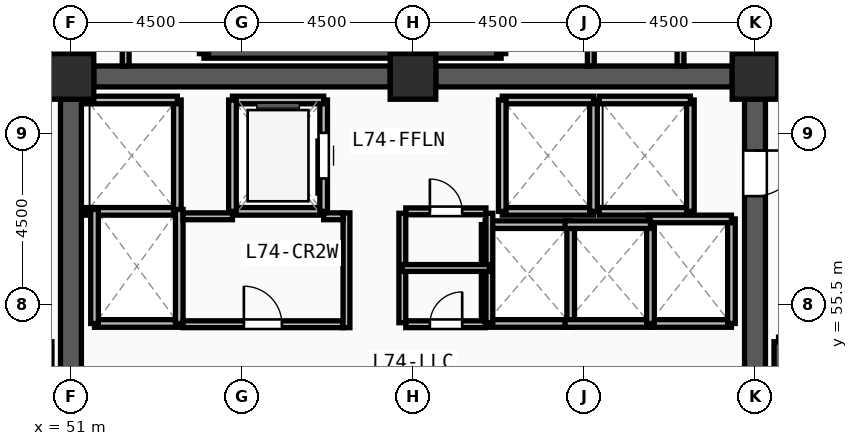
"""IFC4 building model, lengths in metres.
Left out: names, types, materials, properties, quantities, classifications, styles, units other than length and angle.
Written with IfcOpenShell. Run it as: python <this file> out.ifc"""

import sys

from ifc_helpers import new_model, si_unit, direction, frame, frame_2d, origin, origin_2d, place, context, subcontext, project, spatial, rectangle, extrude, source, transform, mapped, element, fill, save


model = new_model("IFC4")
c1 = context("Model", 3, precision=1e-05, world=origin(), true_north=direction((0.0, 1.0)))
c2 = subcontext(c1, "Body", "Model", "MODEL_VIEW")
j1 = project(units=[si_unit("LENGTHUNIT", "METRE"), si_unit("PLANEANGLEUNIT", "RADIAN")], contexts=[c1])
p1 = place(None, origin())
s1 = spatial("IfcSite", under=j1, at=p1, CompositionType="ELEMENT")
p2 = place(p1, origin())
s2 = spatial("IfcBuilding", under=s1, at=p2, CompositionType="ELEMENT")
p3 = place(p2, frame((0.0, 0.0, 286.5)))
s3 = spatial("IfcBuildingStorey", under=s2, at=p3, CompositionType="ELEMENT", Elevation=286.5)
m1 = source(origin(), c2, "Body", "SweptSolid", [
    extrude(rectangle(XDim=1.2, YDim=1.2, at=origin_2d()), origin(), (0.0, 0.0, 1.0), 3.75),
])
for number, where, z_axis, x_axis in (
    (1, (69.0, 61.5, 0.0), (0.0, 0.0, 1.0), (1.0, 0.0, 0.0)),
    (2, (60.0, 61.5, 0.0), (0.0, 0.0, 1.0), (1.0, 0.0, 0.0)),
    (3, (51.0, 61.5, 0.0), (0.0, 0.0, 1.0), (1.0, 0.0, 0.0)),
):
    element("IfcColumn", number, at=place(p3, frame(where, z_axis=z_axis, x_axis=x_axis)), inside=s3, PredefinedType="COLUMN", context=c2, shape_type="MappedRepresentation", body=[
        mapped(m1, transform((0.0, 0.0, 0.0), x_axis=(1.0, 0.0, 0.0), y_axis=(0.0, 1.0, 0.0), z_axis=(0.0, 0.0, 1.0), scale=1.0)),
    ])
for number, where, z_axis, x_axis in (
    (4, (51.6, 61.5, 0.0), (0.0, 0.0, 1.0), (1.0, 0.0, 0.0)),
    (5, (60.6, 61.5, 0.0), (0.0, 0.0, 1.0), (1.0, 0.0, 0.0)),
):
    element("IfcWall", number, at=place(p3, frame(where, z_axis=z_axis, x_axis=x_axis)), inside=s3, PredefinedType="SHEAR", context=c2, shape_type="SweptSolid", body=[
        extrude(rectangle(XDim=7.8, YDim=0.55, at=frame_2d((3.9, 0.0))), origin(), (0.0, 0.0, 1.0), 3.57),
    ])
p4 = place(p3, frame((69.0, 60.9, 0.0), z_axis=(0.0, 0.0, 1.0), x_axis=(0.0, -1.0, 0.0)))
e6 = element("IfcWall", 6, at=p4, inside=s3, PredefinedType="SHEAR", context=c2, shape_type="SweptSolid", body=[
    extrude(rectangle(XDim=13.8, YDim=0.55, at=frame_2d((6.9, 0.0))), origin(), (0.0, 0.0, 1.0), 3.57),
])
m2 = source(origin(), c2, "Body", "SweptSolid", [
    extrude(rectangle(XDim=1.2, YDim=2.2, at=frame_2d((0.6, 1.1))), frame((0.0, 0.285, 0.0), z_axis=(0.0, -1.0, 0.0), x_axis=(1.0, 0.0, 0.0)), (0.0, 0.0, 1.0), 0.57),
])
p5 = place(p4, frame((1.35, 0.0, 0.0)))
e7 = element("IfcOpeningElement", 7, at=p5, cuts=e6, PredefinedType="OPENING", context=c2, shape_type="MappedRepresentation", body=[
    mapped(m2, transform((0.0, 0.0, 0.0), x_axis=(1.0, 0.0, 0.0), y_axis=(0.0, 1.0, 0.0), z_axis=(0.0, 0.0, 1.0), scale=1.0)),
])
p6 = place(p3, frame((51.0, 47.1, 0.0), z_axis=(0.0, 0.0, 1.0), x_axis=(0.0, 1.0, 0.0)))
e8 = element("IfcWall", 8, at=p6, inside=s3, PredefinedType="SHEAR", context=c2, shape_type="SweptSolid", body=[
    extrude(rectangle(XDim=13.8, YDim=0.55, at=frame_2d((6.9, 0.0))), origin(), (0.0, 0.0, 1.0), 3.57),
])
for number, where, z_axis, x_axis in (
    (9, (69.62, 54.52, 0.0), (0.0, 0.0, 1.0), (0.0, -1.0, 0.0)),
    (10, (54.5, 62.1, 0.0), (0.0, 0.0, 1.0), (1.0, 0.0, 0.0)),
):
    element("IfcWall", number, at=place(p3, frame(where, z_axis=z_axis, x_axis=x_axis)), inside=s3, PredefinedType="SOLIDWALL", context=c2, shape_type="SweptSolid", body=[
        extrude(rectangle(XDim=7.82, YDim=0.24, at=frame_2d((3.91, 0.0))), origin(), (0.0, 0.0, 1.0), 3.57),
    ])
for number, where, z_axis, x_axis in (
    (11, (62.32, 62.1, 0.0), (0.0, 0.0, 1.0), (0.0, 1.0, 0.0)),
    (12, (54.5, 65.54, 0.0), (0.0, 0.0, 1.0), (0.0, -1.0, 0.0)),
):
    element("IfcWall", number, at=place(p3, frame(where, z_axis=z_axis, x_axis=x_axis)), inside=s3, PredefinedType="SOLIDWALL", context=c2, shape_type="SweptSolid", body=[
        extrude(rectangle(XDim=3.44, YDim=0.24, at=frame_2d((1.72, 0.0))), origin(), (0.0, 0.0, 1.0), 3.57),
    ])
p7 = place(p3, frame((55.25, 57.95, 0.0), z_axis=(0.0, 0.0, 1.0), x_axis=(1.0, 0.0, 0.0)))
e13 = element("IfcWall", 13, at=p7, inside=s3, PredefinedType="SOLIDWALL", context=c2, shape_type="SweptSolid", body=[
    extrude(rectangle(XDim=2.4, YDim=0.2, at=frame_2d((1.2, 0.0))), origin(), (0.0, 0.0, 1.0), 3.57),
])
p8 = place(p3, frame((57.65, 57.95, 0.0), z_axis=(0.0, 0.0, 1.0), x_axis=(0.0, 1.0, 0.0)))
e14 = element("IfcWall", 14, at=p8, inside=s3, PredefinedType="SOLIDWALL", context=c2, shape_type="SweptSolid", body=[
    extrude(rectangle(XDim=2.93, YDim=0.2, at=frame_2d((1.465, 0.0))), origin(), (0.0, 0.0, 1.0), 3.57),
])
m3 = source(origin(), c2, "Body", "SweptSolid", [
    extrude(rectangle(XDim=1.2, YDim=2.3, at=frame_2d((0.6, 1.15))), frame((0.0, 0.11, 0.0), z_axis=(0.0, -1.0, 0.0), x_axis=(1.0, 0.0, 0.0)), (0.0, 0.0, 1.0), 0.22),
])
p9 = place(p8, frame((0.865, 0.0, 0.0)))
e15 = element("IfcOpeningElement", 15, at=p9, cuts=e14, PredefinedType="OPENING", context=c2, shape_type="MappedRepresentation", body=[
    mapped(m3, transform((0.0, 0.0, 0.0), x_axis=(1.0, 0.0, 0.0), y_axis=(0.0, 1.0, 0.0), z_axis=(0.0, 0.0, 1.0), scale=1.0)),
])
p10 = place(p3, frame((57.65, 60.88, 0.0), z_axis=(0.0, 0.0, 1.0), x_axis=(-1.0, 0.0, 0.0)))
e16 = element("IfcWall", 16, at=p10, inside=s3, PredefinedType="SOLIDWALL", context=c2, shape_type="SweptSolid", body=[
    extrude(rectangle(XDim=2.4, YDim=0.2, at=frame_2d((1.2, 0.0))), origin(), (0.0, 0.0, 1.0), 3.57),
])
p11 = place(p3, frame((55.25, 60.88, 0.0), z_axis=(0.0, 0.0, 1.0), x_axis=(0.0, -1.0, 0.0)))
e17 = element("IfcWall", 17, at=p11, inside=s3, PredefinedType="SOLIDWALL", context=c2, shape_type="SweptSolid", body=[
    extrude(rectangle(XDim=2.93, YDim=0.2, at=frame_2d((1.465, 0.0))), origin(), (0.0, 0.0, 1.0), 3.57),
])
p12 = place(p3, frame((62.35, 57.95, 0.0), z_axis=(0.0, 0.0, 1.0), x_axis=(1.0, 0.0, 0.0)))
e18 = element("IfcWall", 18, at=p12, inside=s3, PredefinedType="SOLIDWALL", context=c2, shape_type="SweptSolid", body=[
    extrude(rectangle(XDim=2.4, YDim=0.2, at=frame_2d((1.2, 0.0))), origin(), (0.0, 0.0, 1.0), 3.57),
])
p13 = place(p3, frame((64.75, 57.95, 0.0), z_axis=(0.0, 0.0, 1.0), x_axis=(0.0, 1.0, 0.0)))
e19 = element("IfcWall", 19, at=p13, inside=s3, PredefinedType="SOLIDWALL", context=c2, shape_type="SweptSolid", body=[
    extrude(rectangle(XDim=2.93, YDim=0.2, at=frame_2d((1.465, 0.0))), origin(), (0.0, 0.0, 1.0), 3.57),
])
p14 = place(p3, frame((64.75, 60.88, 0.0), z_axis=(0.0, 0.0, 1.0), x_axis=(-1.0, 0.0, 0.0)))
e20 = element("IfcWall", 20, at=p14, inside=s3, PredefinedType="SOLIDWALL", context=c2, shape_type="SweptSolid", body=[
    extrude(rectangle(XDim=2.4, YDim=0.2, at=frame_2d((1.2, 0.0))), origin(), (0.0, 0.0, 1.0), 3.57),
])
p15 = place(p3, frame((62.35, 60.88, 0.0), z_axis=(0.0, 0.0, 1.0), x_axis=(0.0, -1.0, 0.0)))
e21 = element("IfcWall", 21, at=p15, inside=s3, PredefinedType="SOLIDWALL", context=c2, shape_type="SweptSolid", body=[
    extrude(rectangle(XDim=2.93, YDim=0.2, at=frame_2d((1.465, 0.0))), origin(), (0.0, 0.0, 1.0), 3.57),
])
p16 = place(p3, frame((64.9, 57.95, 0.0), z_axis=(0.0, 0.0, 1.0), x_axis=(1.0, 0.0, 0.0)))
e22 = element("IfcWall", 22, at=p16, inside=s3, PredefinedType="SOLIDWALL", context=c2, shape_type="SweptSolid", body=[
    extrude(rectangle(XDim=2.4, YDim=0.2, at=frame_2d((1.2, 0.0))), origin(), (0.0, 0.0, 1.0), 3.57),
])
p17 = place(p3, frame((67.3, 57.95, 0.0), z_axis=(0.0, 0.0, 1.0), x_axis=(0.0, 1.0, 0.0)))
e23 = element("IfcWall", 23, at=p17, inside=s3, PredefinedType="SOLIDWALL", context=c2, shape_type="SweptSolid", body=[
    extrude(rectangle(XDim=2.93, YDim=0.2, at=frame_2d((1.465, 0.0))), origin(), (0.0, 0.0, 1.0), 3.57),
])
for number, where, z_axis, x_axis in (
    (24, (67.3, 60.88, 0.0), (0.0, 0.0, 1.0), (-1.0, 0.0, 0.0)),
    (25, (51.4, 57.95, 0.0), (0.0, 0.0, 1.0), (1.0, 0.0, 0.0)),
):
    element("IfcWall", number, at=place(p3, frame(where, z_axis=z_axis, x_axis=x_axis)), inside=s3, PredefinedType="SOLIDWALL", context=c2, shape_type="SweptSolid", body=[
        extrude(rectangle(XDim=2.4, YDim=0.2, at=frame_2d((1.2, 0.0))), origin(), (0.0, 0.0, 1.0), 3.57),
    ])
p18 = place(p3, frame((53.8, 57.95, 0.0), z_axis=(0.0, 0.0, 1.0), x_axis=(0.0, 1.0, 0.0)))
e26 = element("IfcWall", 26, at=p18, inside=s3, PredefinedType="SOLIDWALL", context=c2, shape_type="SweptSolid", body=[
    extrude(rectangle(XDim=2.93, YDim=0.2, at=frame_2d((1.465, 0.0))), origin(), (0.0, 0.0, 1.0), 3.57),
])
p19 = place(p3, frame((53.8, 60.88, 0.0), z_axis=(0.0, 0.0, 1.0), x_axis=(-1.0, 0.0, 0.0)))
e27 = element("IfcWall", 27, at=p19, inside=s3, PredefinedType="SOLIDWALL", context=c2, shape_type="SweptSolid", body=[
    extrude(rectangle(XDim=2.4, YDim=0.2, at=frame_2d((1.2, 0.0))), origin(), (0.0, 0.0, 1.0), 3.57),
])
p20 = place(p3, frame((51.62, 55.0, 0.0), z_axis=(0.0, 0.0, 1.0), x_axis=(1.0, 0.0, 0.0)))
e28 = element("IfcWall", 28, at=p20, inside=s3, PredefinedType="SOLIDWALL", context=c2, shape_type="SweptSolid", body=[
    extrude(rectangle(XDim=2.23, YDim=0.2, at=frame_2d((1.115, 0.0))), origin(), (0.0, 0.0, 1.0), 3.57),
])
for number, where, z_axis, x_axis in (
    (29, (53.85, 55.0, 0.0), (0.0, 0.0, 1.0), (0.0, 1.0, 0.0)),
    (30, (51.62, 58.0, 0.0), (0.0, 0.0, 1.0), (0.0, -1.0, 0.0)),
):
    element("IfcWall", number, at=place(p3, frame(where, z_axis=z_axis, x_axis=x_axis)), inside=s3, PredefinedType="SOLIDWALL", context=c2, shape_type="SweptSolid", body=[
        extrude(rectangle(XDim=3.0, YDim=0.2, at=frame_2d((1.5, 0.0))), origin(), (0.0, 0.0, 1.0), 3.57),
    ])
p21 = place(p3, frame((66.2, 55.0, 0.0), z_axis=(0.0, 0.0, 1.0), x_axis=(1.0, 0.0, 0.0)))
e31 = element("IfcWall", 31, at=p21, inside=s3, PredefinedType="SOLIDWALL", context=c2, shape_type="SweptSolid", body=[
    extrude(rectangle(XDim=2.18, YDim=0.2, at=frame_2d((1.09, 0.0))), origin(), (0.0, 0.0, 1.0), 3.57),
])
p22 = place(p3, frame((68.38, 55.0, 0.0), z_axis=(0.0, 0.0, 1.0), x_axis=(0.0, 1.0, 0.0)))
e32 = element("IfcWall", 32, at=p22, inside=s3, PredefinedType="SOLIDWALL", context=c2, shape_type="SweptSolid", body=[
    extrude(rectangle(XDim=2.75, YDim=0.2, at=frame_2d((1.375, 0.0))), origin(), (0.0, 0.0, 1.0), 3.57),
])
p23 = place(p3, frame((68.38, 57.75, 0.0), z_axis=(0.0, 0.0, 1.0), x_axis=(-1.0, 0.0, 0.0)))
e33 = element("IfcWall", 33, at=p23, inside=s3, PredefinedType="SOLIDWALL", context=c2, shape_type="SweptSolid", body=[
    extrude(rectangle(XDim=2.18, YDim=0.2, at=frame_2d((1.09, 0.0))), origin(), (0.0, 0.0, 1.0), 3.57),
])
p24 = place(p3, frame((61.9, 55.0, 0.0), z_axis=(0.0, 0.0, 1.0), x_axis=(1.0, 0.0, 0.0)))
e34 = element("IfcWall", 34, at=p24, inside=s3, PredefinedType="SOLIDWALL", context=c2, shape_type="SweptSolid", body=[
    extrude(rectangle(XDim=2.25, YDim=0.2, at=frame_2d((1.125, 0.0))), origin(), (0.0, 0.0, 1.0), 3.57),
])
p25 = place(p3, frame((64.15, 55.0, 0.0), z_axis=(0.0, 0.0, 1.0), x_axis=(0.0, 1.0, 0.0)))
e35 = element("IfcWall", 35, at=p25, inside=s3, PredefinedType="SOLIDWALL", context=c2, shape_type="SweptSolid", body=[
    extrude(rectangle(XDim=2.6, YDim=0.2, at=frame_2d((1.3, 0.0))), origin(), (0.0, 0.0, 1.0), 3.57),
])
p26 = place(p3, frame((64.15, 57.6, 0.0), z_axis=(0.0, 0.0, 1.0), x_axis=(-1.0, 0.0, 0.0)))
e36 = element("IfcWall", 36, at=p26, inside=s3, PredefinedType="SOLIDWALL", context=c2, shape_type="SweptSolid", body=[
    extrude(rectangle(XDim=2.25, YDim=0.2, at=frame_2d((1.125, 0.0))), origin(), (0.0, 0.0, 1.0), 3.57),
])
p27 = place(p3, frame((61.9, 57.6, 0.0), z_axis=(0.0, 0.0, 1.0), x_axis=(0.0, -1.0, 0.0)))
e37 = element("IfcWall", 37, at=p27, inside=s3, PredefinedType="SOLIDWALL", context=c2, shape_type="SweptSolid", body=[
    extrude(rectangle(XDim=2.6, YDim=0.2, at=frame_2d((1.3, 0.0))), origin(), (0.0, 0.0, 1.0), 3.57),
])
p28 = place(p3, frame((64.0, 55.0, 0.0), z_axis=(0.0, 0.0, 1.0), x_axis=(1.0, 0.0, 0.0)))
e38 = element("IfcWall", 38, at=p28, inside=s3, PredefinedType="SOLIDWALL", context=c2, shape_type="SweptSolid", body=[
    extrude(rectangle(XDim=2.25, YDim=0.2, at=frame_2d((1.125, 0.0))), origin(), (0.0, 0.0, 1.0), 3.57),
])
p29 = place(p3, frame((66.25, 55.0, 0.0), z_axis=(0.0, 0.0, 1.0), x_axis=(0.0, 1.0, 0.0)))
e39 = element("IfcWall", 39, at=p29, inside=s3, PredefinedType="SOLIDWALL", context=c2, shape_type="SweptSolid", body=[
    extrude(rectangle(XDim=2.6, YDim=0.2, at=frame_2d((1.3, 0.0))), origin(), (0.0, 0.0, 1.0), 3.57),
])
p30 = place(p3, frame((66.25, 57.6, 0.0), z_axis=(0.0, 0.0, 1.0), x_axis=(-1.0, 0.0, 0.0)))
e40 = element("IfcWall", 40, at=p30, inside=s3, PredefinedType="SOLIDWALL", context=c2, shape_type="SweptSolid", body=[
    extrude(rectangle(XDim=2.25, YDim=0.2, at=frame_2d((1.125, 0.0))), origin(), (0.0, 0.0, 1.0), 3.57),
])
p31 = place(p3, frame((53.95, 54.98, 0.0), z_axis=(0.0, 0.0, 1.0), x_axis=(1.0, 0.0, 0.0)))
e41 = element("IfcWall", 41, at=p31, inside=s3, PredefinedType="PARTITIONING", context=c2, shape_type="SweptSolid", body=[
    extrude(rectangle(XDim=4.21, YDim=0.18, at=frame_2d((2.105, 0.0))), origin(), (0.0, 0.0, 1.0), 3.57),
])
m4 = source(origin(), c2, "Body", "SweptSolid", [
    extrude(rectangle(XDim=1.0, YDim=2.2, at=frame_2d((0.5, 1.1))), frame((0.0, 0.1, 0.0), z_axis=(0.0, -1.0, 0.0), x_axis=(1.0, 0.0, 0.0)), (0.0, 0.0, 1.0), 0.2),
])
p32 = place(p31, frame((1.6, 0.0, 0.0)))
e42 = element("IfcOpeningElement", 42, at=p32, cuts=e41, PredefinedType="OPENING", context=c2, shape_type="MappedRepresentation", body=[
    mapped(m4, transform((0.0, 0.0, 0.0), x_axis=(1.0, 0.0, 0.0), y_axis=(0.0, 1.0, 0.0), z_axis=(0.0, 0.0, 1.0), scale=1.0)),
])
p33 = place(p3, frame((59.81, 54.98, 0.0), z_axis=(0.0, 0.0, 1.0), x_axis=(1.0, 0.0, 0.0)))
e43 = element("IfcWall", 43, at=p33, inside=s3, PredefinedType="PARTITIONING", context=c2, shape_type="SweptSolid", body=[
    extrude(rectangle(XDim=2.09, YDim=0.18, at=frame_2d((1.045, 0.0))), origin(), (0.0, 0.0, 1.0), 3.57),
])
m5 = source(origin(), c2, "Body", "SweptSolid", [
    extrude(rectangle(XDim=0.85, YDim=2.1, at=frame_2d((0.425, 1.05))), frame((0.0, 0.1, 0.0), z_axis=(0.0, -1.0, 0.0), x_axis=(1.0, 0.0, 0.0)), (0.0, 0.0, 1.0), 0.2),
])
p34 = place(p33, frame((0.635, 0.0, 0.0)))
e44 = element("IfcOpeningElement", 44, at=p34, cuts=e43, PredefinedType="OPENING", context=c2, shape_type="MappedRepresentation", body=[
    mapped(m5, transform((0.0, 0.0, 0.0), x_axis=(1.0, 0.0, 0.0), y_axis=(0.0, 1.0, 0.0), z_axis=(0.0, 0.0, 1.0), scale=1.0)),
])
p35 = place(p3, frame((59.81, 57.95, 0.0), z_axis=(0.0, 0.0, 1.0), x_axis=(1.0, 0.0, 0.0)))
e45 = element("IfcWall", 45, at=p35, inside=s3, PredefinedType="PARTITIONING", context=c2, shape_type="SweptSolid", body=[
    extrude(rectangle(XDim=2.11, YDim=0.18, at=frame_2d((1.055, 0.0))), origin(), (0.0, 0.0, 1.0), 3.57),
])
p36 = place(p35, frame((0.635, 0.0, 0.0)))
e46 = element("IfcOpeningElement", 46, at=p36, cuts=e45, PredefinedType="OPENING", context=c2, shape_type="MappedRepresentation", body=[
    mapped(m5, transform((0.0, 0.0, 0.0), x_axis=(1.0, 0.0, 0.0), y_axis=(0.0, 1.0, 0.0), z_axis=(0.0, 0.0, 1.0), scale=1.0)),
])
for number, where, z_axis, x_axis in (
    (47, (59.72, 55.02, 0.0), (0.0, 0.0, 1.0), (0.0, 1.0, 0.0)),
    (48, (62.01, 55.02, 0.0), (0.0, 0.0, 1.0), (0.0, 1.0, 0.0)),
):
    element("IfcWall", number, at=place(p3, frame(where, z_axis=z_axis, x_axis=x_axis)), inside=s3, PredefinedType="PARTITIONING", context=c2, shape_type="SweptSolid", body=[
        extrude(rectangle(XDim=2.88, YDim=0.18, at=frame_2d((1.44, 0.0))), origin(), (0.0, 0.0, 1.0), 3.57),
    ])
p37 = place(p3, frame((59.72, 56.46, 0.0), z_axis=(0.0, 0.0, 1.0), x_axis=(1.0, 0.0, 0.0)))
e49 = element("IfcWall", 49, at=p37, inside=s3, PredefinedType="PARTITIONING", context=c2, shape_type="SweptSolid", body=[
    extrude(rectangle(XDim=2.29, YDim=0.18, at=frame_2d((1.145, 0.0))), origin(), (0.0, 0.0, 1.0), 3.57),
])
p38 = place(p3, frame((50.54, 61.95, 0.0), z_axis=(0.0, 0.0, 1.0), x_axis=(0.0, 1.0, 0.0)))
e50 = element("IfcWall", 50, at=p38, inside=s3, PredefinedType="PARTITIONING", context=c2, shape_type="SweptSolid", body=[
    extrude(rectangle(XDim=3.63, YDim=0.18, at=frame_2d((1.815, 0.0))), origin(), (0.0, 0.0, 1.0), 3.57),
])
for number, where, z_axis, x_axis in (
    (51, (52.44, 61.775, 0.0), (0.0, 0.0, 1.0), (0.0, 1.0, 0.0)),
    (52, (64.68, 61.775, 0.0), (0.0, 0.0, 1.0), (0.0, 1.0, 0.0)),
    (53, (67.04, 61.775, 0.0), (0.0, 0.0, 1.0), (0.0, 1.0, 0.0)),
):
    element("IfcWall", number, at=place(p3, frame(where, z_axis=z_axis, x_axis=x_axis)), inside=s3, PredefinedType="PARTITIONING", context=c2, shape_type="SweptSolid", body=[
        extrude(rectangle(XDim=3.805, YDim=0.18, at=frame_2d((1.903, 0.0))), origin(), (0.0, 0.0, 1.0), 3.57),
    ])
p39 = place(p3, frame((69.46, 61.95, 0.0), z_axis=(0.0, 0.0, 1.0), x_axis=(0.0, 1.0, 0.0)))
e54 = element("IfcWall", 54, at=p39, inside=s3, PredefinedType="PARTITIONING", context=c2, shape_type="SweptSolid", body=[
    extrude(rectangle(XDim=3.63, YDim=0.18, at=frame_2d((1.815, 0.0))), origin(), (0.0, 0.0, 1.0), 3.57),
])
p40 = place(p3, frame((58.25, 54.89, 0.0), z_axis=(0.0, 0.0, 1.0), x_axis=(0.0, 1.0, 0.0)))
e55 = element("IfcWall", 55, at=p40, inside=s3, PredefinedType="PARTITIONING", context=c2, shape_type="SweptSolid", body=[
    extrude(rectangle(XDim=3.02, YDim=0.18, at=frame_2d((1.51, 0.0))), origin(), (0.0, 0.0, 1.0), 3.57),
])
p41 = place(p3, frame((53.95, 57.82, 0.0), z_axis=(0.0, 0.0, 1.0), x_axis=(1.0, 0.0, 0.0)))
e56 = element("IfcWall", 56, at=p41, inside=s3, PredefinedType="PARTITIONING", context=c2, shape_type="SweptSolid", body=[
    extrude(rectangle(XDim=1.3, YDim=0.18, at=frame_2d((0.65, 0.0))), origin(), (0.0, 0.0, 1.0), 3.57),
])
p42 = place(p3, frame((57.65, 57.82, 0.0), z_axis=(0.0, 0.0, 1.0), x_axis=(1.0, 0.0, 0.0)))
e57 = element("IfcWall", 57, at=p42, inside=s3, PredefinedType="PARTITIONING", context=c2, shape_type="SweptSolid", body=[
    extrude(rectangle(XDim=0.51, YDim=0.18, at=frame_2d((0.255, 0.0))), origin(), (0.0, 0.0, 1.0), 3.57),
])
m6 = source(origin(), c2, "Body", "SweptSolid", [
    extrude(rectangle(XDim=1.2, YDim=2.2, at=frame_2d((0.6, 1.1))), frame((0.0, 0.025, 0.0), z_axis=(0.0, -1.0, 0.0), x_axis=(1.0, 0.0, 0.0)), (0.0, 0.0, 1.0), 0.05),
])
p43 = place(p5, origin())
e58 = element("IfcDoor", 58, at=p43, inside=s3, OperationType="SINGLE_SWING_LEFT", PredefinedType="DOOR", context=c2, shape_type="MappedRepresentation", body=[
    mapped(m6, transform((0.0, 0.0, 0.0), x_axis=(1.0, 0.0, 0.0), y_axis=(0.0, 1.0, 0.0), z_axis=(0.0, 0.0, 1.0), scale=1.0)),
])
fill(e7, e58)
m7 = source(origin(), c2, "Body", "SweptSolid", [
    extrude(rectangle(XDim=1.2, YDim=2.3, at=frame_2d((0.6, 1.15))), frame((0.0, 0.025, 0.0), z_axis=(0.0, -1.0, 0.0), x_axis=(1.0, 0.0, 0.0)), (0.0, 0.0, 1.0), 0.05),
])
p44 = place(p9, origin())
e59 = element("IfcDoor", 59, at=p44, inside=s3, OperationType="SLIDING_TO_LEFT", PredefinedType="DOOR", context=c2, shape_type="MappedRepresentation", body=[
    mapped(m7, transform((0.0, 0.0, 0.0), x_axis=(1.0, 0.0, 0.0), y_axis=(0.0, 1.0, 0.0), z_axis=(0.0, 0.0, 1.0), scale=1.0)),
])
fill(e15, e59)
m8 = source(origin(), c2, "Body", "SweptSolid", [
    extrude(rectangle(XDim=1.0, YDim=2.2, at=frame_2d((0.5, 1.1))), frame((0.0, 0.025, 0.0), z_axis=(0.0, -1.0, 0.0), x_axis=(1.0, 0.0, 0.0)), (0.0, 0.0, 1.0), 0.05),
])
p45 = place(p32, origin())
e60 = element("IfcDoor", 60, at=p45, inside=s3, OperationType="SINGLE_SWING_LEFT", PredefinedType="DOOR", context=c2, shape_type="MappedRepresentation", body=[
    mapped(m8, transform((0.0, 0.0, 0.0), x_axis=(1.0, 0.0, 0.0), y_axis=(0.0, 1.0, 0.0), z_axis=(0.0, 0.0, 1.0), scale=1.0)),
])
fill(e42, e60)
m9 = source(origin(), c2, "Body", "SweptSolid", [
    extrude(rectangle(XDim=0.85, YDim=2.1, at=frame_2d((0.425, 1.05))), frame((0.0, 0.025, 0.0), z_axis=(0.0, -1.0, 0.0), x_axis=(1.0, 0.0, 0.0)), (0.0, 0.0, 1.0), 0.05),
])
p46 = place(p34, origin())
e61 = element("IfcDoor", 61, at=p46, inside=s3, OperationType="SINGLE_SWING_RIGHT", PredefinedType="DOOR", context=c2, shape_type="MappedRepresentation", body=[
    mapped(m9, transform((0.0, 0.0, 0.0), x_axis=(1.0, 0.0, 0.0), y_axis=(0.0, 1.0, 0.0), z_axis=(0.0, 0.0, 1.0), scale=1.0)),
])
fill(e44, e61)
p47 = place(p36, origin())
e62 = element("IfcDoor", 62, at=p47, inside=s3, OperationType="SINGLE_SWING_LEFT", PredefinedType="DOOR", context=c2, shape_type="MappedRepresentation", body=[
    mapped(m9, transform((0.0, 0.0, 0.0), x_axis=(1.0, 0.0, 0.0), y_axis=(0.0, 1.0, 0.0), z_axis=(0.0, 0.0, 1.0), scale=1.0)),
])
fill(e46, e62)
save(model, sys.argv[1])
